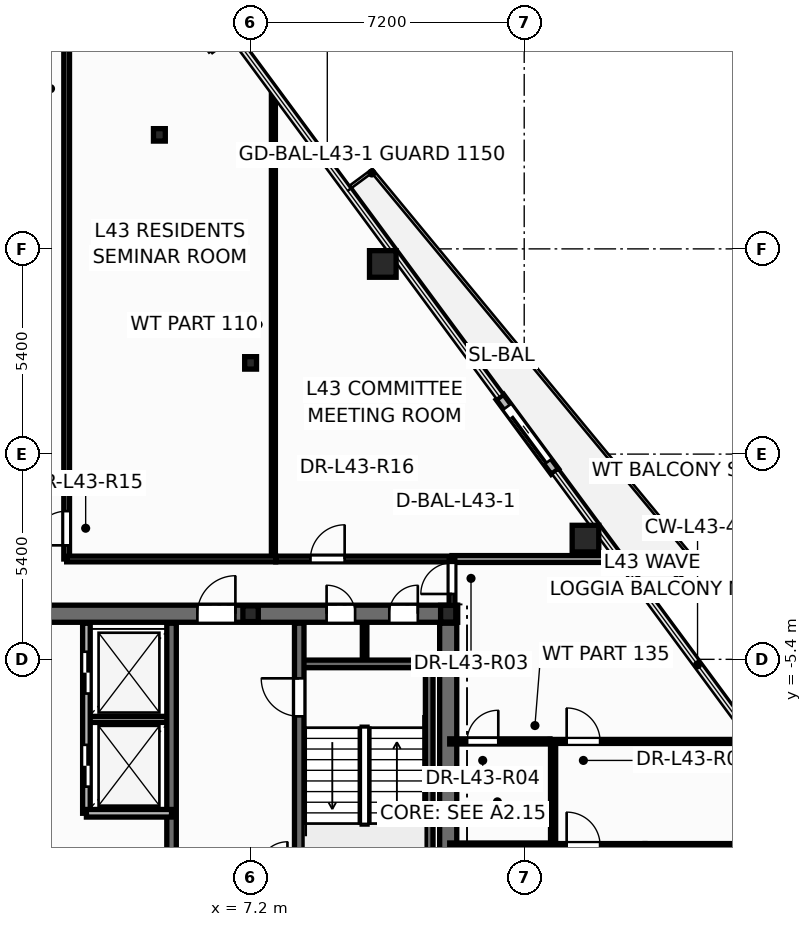
"""IFC4 building model, lengths in metres.
Left out: names, types, materials, properties, quantities, classifications, styles, units other than length and angle.
Written with IfcOpenShell. Run it as: python <this file> out.ifc"""

import sys

from ifc_helpers import new_model, si_unit, direction, frame, frame_2d, origin, origin_2d, place, context, subcontext, project, spatial, rectangle, hollow_circle, i_section, extrude, element, fill, save


model = new_model("IFC4")
c1 = context("Model", 3, precision=1e-05, world=origin(), true_north=direction((0.0, 1.0)))
c2 = subcontext(c1, "Body", "Model", "MODEL_VIEW")
j1 = project(units=[si_unit("LENGTHUNIT", "METRE"), si_unit("PLANEANGLEUNIT", "RADIAN")], contexts=[c1])
p1 = place(None, origin())
s1 = spatial("IfcSite", under=j1, at=p1, CompositionType="ELEMENT")
p2 = place(p1, origin())
s2 = spatial("IfcBuilding", under=s1, at=p2, CompositionType="ELEMENT")
p3 = place(p2, frame((0.0, 0.0, 165.3)))
s3 = spatial("IfcBuildingStorey", under=s2, at=p3, CompositionType="ELEMENT", Elevation=165.3)
for number, where, z_axis, x_axis in (
    (1, (16.012, -2.223, 0.0), (0.0, 0.0, 1.0), (1.0, 0.0, 0.0)),
    (2, (10.679, 5.003, 0.0), (0.0, 0.0, 1.0), (1.0, 0.0, 0.0)),
):
    element("IfcColumn", number, at=place(p3, frame(where, z_axis=z_axis, x_axis=x_axis)), inside=s3, PredefinedType="COLUMN", context=c2, shape_type="SweptSolid", body=[
        extrude(hollow_circle(Radius=0.35, WallThickness=0.03, at=origin_2d()), origin(), (0.0, 0.0, 1.0), 3.6),
    ])
p4 = place(p3, frame((12.4, -4.2, 0.0), z_axis=(0.0, 0.0, 1.0), x_axis=(1.0, 0.0, 0.0)))
e3 = element("IfcColumn", 3, at=p4, inside=s3, PredefinedType="COLUMN", context=c2, shape_type="SweptSolid", body=[
    extrude(i_section(OverallWidth=0.4, OverallDepth=0.44, WebThickness=0.028, FlangeThickness=0.04, at=origin_2d()), origin(), (0.0, 0.0, 1.0), 3.6),
])
p5 = place(p3, frame((7.2, -4.2, 0.0), z_axis=(0.0, 0.0, 1.0), x_axis=(1.0, 0.0, 0.0)))
e4 = element("IfcColumn", 4, at=p5, inside=s3, PredefinedType="PILASTER", context=c2, shape_type="SweptSolid", body=[
    extrude(i_section(OverallWidth=0.405, OverallDepth=0.414, WebThickness=0.022, FlangeThickness=0.032, at=origin_2d()), origin(), (0.0, 0.0, 1.0), 3.6),
])
for number, where, z_axis, x_axis in (
    (5, (7.2, 2.4, 0.0), (0.0, 0.0, 1.0), (1.0, 0.0, 0.0)),
    (6, (4.8, 8.4, 0.0), (0.0, 0.0, 1.0), (1.0, 0.0, 0.0)),
):
    element("IfcColumn", number, at=place(p3, frame(where, z_axis=z_axis, x_axis=x_axis)), inside=s3, PredefinedType="COLUMN", context=c2, shape_type="SweptSolid", body=[
        extrude(i_section(OverallWidth=0.311, OverallDepth=0.327, WebThickness=0.016, FlangeThickness=0.025, at=origin_2d()), origin(), (0.0, 0.0, 1.0), 3.6),
    ])
p6 = place(p3, frame((15.208, -0.461, -0.015), z_axis=(0.0, 0.0, 1.0), x_axis=(-0.593785976482, 0.804623026102, 0.0)))
e7 = element("IfcWall", 7, at=p6, inside=s3, PredefinedType="STANDARD", context=c2, shape_type="SweptSolid", body=[
    extrude(rectangle(XDim=2.44, YDim=0.24, at=frame_2d((1.22, 0.0))), origin(), (0.0, 0.0, 1.0), 2.737),
])
p7 = place(p6, frame((0.32, 0.0, 0.015)))
e8 = element("IfcOpeningElement", 8, at=p7, cuts=e7, PredefinedType="OPENING", context=c2, shape_type="SweptSolid", body=[
    extrude(rectangle(XDim=1.806, YDim=2.204, at=frame_2d((0.9, 1.102))), frame((0.0, 0.13, 0.0), z_axis=(0.0, -1.0, 0.0), x_axis=(1.0, 0.0, 0.0)), (0.0, 0.0, 1.0), 0.26),
])
p8 = place(p3, frame((2.88, -6.98, 0.0), z_axis=(0.0, 0.0, 1.0), x_axis=(1.0, 0.0, 0.0)))
e9 = element("IfcWall", 9, at=p8, inside=s3, PredefinedType="PARTITIONING", context=c2, shape_type="SweptSolid", body=[
    extrude(rectangle(XDim=2.24, YDim=0.16, at=frame_2d((1.12, 0.0))), origin(), (0.0, 0.0, 1.0), 3.28),
])
p9 = place(p3, frame((10.2, -5.52, 0.0), z_axis=(0.0, 0.0, 1.0), x_axis=(0.0, 1.0, 0.0)))
e10 = element("IfcWall", 10, at=p9, inside=s3, PredefinedType="PARTITIONING", context=c2, shape_type="SweptSolid", body=[
    extrude(rectangle(XDim=1.12, YDim=0.12, at=frame_2d((0.56, 0.0))), origin(), (0.0, 0.0, 1.0), 3.28),
])
p10 = place(p3, frame((-12.65, -4.2, 0.0), z_axis=(0.0, 0.0, 1.0), x_axis=(1.0, 0.0, 0.0)))
e11 = element("IfcWall", 11, at=p10, inside=s3, PredefinedType="SHEAR", context=c2, shape_type="SweptSolid", body=[
    extrude(rectangle(XDim=25.3, YDim=0.45, at=frame_2d((12.65, 0.0))), origin(), (0.0, 0.0, 1.0), 3.6),
])
p11 = place(p10, frame((1.85, 0.0, 0.0)))
e12 = element("IfcOpeningElement", 12, at=p11, cuts=e11, PredefinedType="OPENING", context=c2, shape_type="SweptSolid", body=[
    extrude(rectangle(XDim=0.756, YDim=2.054, at=frame_2d((0.375, 1.027))), frame((0.0, 0.235, 0.0), z_axis=(0.0, -1.0, 0.0), x_axis=(1.0, 0.0, 0.0)), (0.0, 0.0, 1.0), 0.47),
])
p12 = place(p10, frame((21.85, 0.0, 0.0)))
e13 = element("IfcOpeningElement", 13, at=p12, cuts=e11, PredefinedType="OPENING", context=c2, shape_type="SweptSolid", body=[
    extrude(rectangle(XDim=0.756, YDim=2.054, at=frame_2d((0.375, 1.027))), frame((0.0, 0.235, 0.0), z_axis=(0.0, -1.0, 0.0), x_axis=(1.0, 0.0, 0.0)), (0.0, 0.0, 1.0), 0.47),
])
p13 = place(p10, frame((23.5, 0.0, 0.0)))
e14 = element("IfcOpeningElement", 14, at=p13, cuts=e11, PredefinedType="OPENING", context=c2, shape_type="SweptSolid", body=[
    extrude(rectangle(XDim=0.756, YDim=2.054, at=frame_2d((0.375, 1.027))), frame((0.0, 0.235, 0.0), z_axis=(0.0, -1.0, 0.0), x_axis=(1.0, 0.0, 0.0)), (0.0, 0.0, 1.0), 0.47),
])
p14 = place(p10, frame((5.85, 0.0, 0.0)))
e15 = element("IfcOpeningElement", 15, at=p14, cuts=e11, PredefinedType="OPENING", context=c2, shape_type="SweptSolid", body=[
    extrude(rectangle(XDim=1.006, YDim=2.104, at=frame_2d((0.5, 1.052))), frame((0.0, 0.235, 0.0), z_axis=(0.0, -1.0, 0.0), x_axis=(1.0, 0.0, 0.0)), (0.0, 0.0, 1.0), 0.47),
])
p15 = place(p10, frame((10.35, 0.0, 0.0)))
e16 = element("IfcOpeningElement", 16, at=p15, cuts=e11, PredefinedType="OPENING", context=c2, shape_type="SweptSolid", body=[
    extrude(rectangle(XDim=1.406, YDim=2.154, at=frame_2d((0.7, 1.077))), frame((0.0, 0.235, 0.0), z_axis=(0.0, -1.0, 0.0), x_axis=(1.0, 0.0, 0.0)), (0.0, 0.0, 1.0), 0.47),
])
p16 = place(p10, frame((18.45, 0.0, 0.0)))
e17 = element("IfcOpeningElement", 17, at=p16, cuts=e11, PredefinedType="OPENING", context=c2, shape_type="SweptSolid", body=[
    extrude(rectangle(XDim=1.006, YDim=2.104, at=frame_2d((0.5, 1.052))), frame((0.0, 0.235, 0.0), z_axis=(0.0, -1.0, 0.0), x_axis=(1.0, 0.0, 0.0)), (0.0, 0.0, 1.0), 0.47),
])
p17 = place(p3, frame((8.48, -5.52, 0.0), z_axis=(0.0, 0.0, 1.0), x_axis=(1.0, 0.0, 0.0)))
e18 = element("IfcWall", 18, at=p17, inside=s3, PredefinedType="SOLIDWALL", context=c2, shape_type="SweptSolid", body=[
    extrude(rectangle(XDim=3.87, YDim=0.2, at=frame_2d((1.935, 0.0))), origin(), (0.0, 0.0, 1.0), 3.6),
])
p18 = place(p3, frame((11.9, -13.1, 0.0), z_axis=(0.0, 0.0, 1.0), x_axis=(0.0, 1.0, 0.0)))
e19 = element("IfcWall", 19, at=p18, inside=s3, PredefinedType="SOLIDWALL", context=c2, shape_type="SweptSolid", body=[
    extrude(rectangle(XDim=7.58, YDim=0.2, at=frame_2d((3.79, 0.0))), origin(), (0.0, 0.0, 1.0), 3.6),
])
p19 = place(p3, frame((8.48, -13.85, 0.0), z_axis=(0.0, 0.0, 1.0), x_axis=(0.0, 1.0, 0.0)))
e20 = element("IfcWall", 20, at=p19, inside=s3, PredefinedType="SHEAR", context=c2, shape_type="SweptSolid", body=[
    extrude(rectangle(XDim=9.4, YDim=0.25, at=frame_2d((4.7, 0.0))), origin(), (0.0, 0.0, 1.0), 3.6),
])
p20 = place(p19, frame((6.95, 0.0, 0.0)))
e21 = element("IfcOpeningElement", 21, at=p20, cuts=e20, PredefinedType="OPENING", context=c2, shape_type="SweptSolid", body=[
    extrude(rectangle(XDim=1.006, YDim=2.104, at=frame_2d((0.5, 1.052))), frame((0.0, 0.135, 0.0), z_axis=(0.0, -1.0, 0.0), x_axis=(1.0, 0.0, 0.0)), (0.0, 0.0, 1.0), 0.27),
])
p21 = place(p3, frame((5.12, -13.85, 0.0), z_axis=(0.0, 0.0, 1.0), x_axis=(0.0, 1.0, 0.0)))
e22 = element("IfcWall", 22, at=p21, inside=s3, PredefinedType="SHEAR", context=c2, shape_type="SweptSolid", body=[
    extrude(rectangle(XDim=9.4, YDim=0.25, at=frame_2d((4.7, 0.0))), origin(), (0.0, 0.0, 1.0), 3.6),
])
p22 = place(p3, frame((12.4, -13.85, 0.0), z_axis=(0.0, 0.0, 1.0), x_axis=(0.0, 1.0, 0.0)))
e23 = element("IfcWall", 23, at=p22, inside=s3, PredefinedType="SHEAR", context=c2, shape_type="SweptSolid", body=[
    extrude(rectangle(XDim=9.4, YDim=0.45, at=frame_2d((4.7, 0.0))), origin(), (0.0, 0.0, 1.0), 3.6),
])
p23 = place(p3, frame((2.88, -9.45, 0.0), z_axis=(0.0, 0.0, 1.0), x_axis=(0.0, 1.0, 0.0)))
e24 = element("IfcWall", 24, at=p23, inside=s3, PredefinedType="SOLIDWALL", context=c2, shape_type="SweptSolid", body=[
    extrude(rectangle(XDim=5.0, YDim=0.2, at=frame_2d((2.5, 0.0))), origin(), (0.0, 0.0, 1.0), 3.28),
])
p24 = place(p23, frame((0.7, 0.0, 0.0)))
e25 = element("IfcOpeningElement", 25, at=p24, cuts=e24, PredefinedType="OPENING", context=c2, shape_type="SweptSolid", body=[
    extrude(rectangle(XDim=1.106, YDim=2.104, at=frame_2d((0.55, 1.052))), frame((0.0, 0.11, 0.0), z_axis=(0.0, -1.0, 0.0), x_axis=(1.0, 0.0, 0.0)), (0.0, 0.0, 1.0), 0.22),
])
p25 = place(p23, frame((3.15, 0.0, 0.0)))
e26 = element("IfcOpeningElement", 26, at=p25, cuts=e24, PredefinedType="OPENING", context=c2, shape_type="SweptSolid", body=[
    extrude(rectangle(XDim=1.106, YDim=2.104, at=frame_2d((0.55, 1.052))), frame((0.0, 0.11, 0.0), z_axis=(0.0, -1.0, 0.0), x_axis=(1.0, 0.0, 0.0)), (0.0, 0.0, 1.0), 0.22),
])
p26 = place(p3, frame((2.88, -9.45, 0.0), z_axis=(0.0, 0.0, 1.0), x_axis=(1.0, 0.0, 0.0)))
e27 = element("IfcWall", 27, at=p26, inside=s3, PredefinedType="SOLIDWALL", context=c2, shape_type="SweptSolid", body=[
    extrude(rectangle(XDim=2.24, YDim=0.2, at=frame_2d((1.12, 0.0))), origin(), (0.0, 0.0, 1.0), 3.28),
])
p27 = place(p3, frame((2.36, -2.76, 0.0), z_axis=(0.0, 0.0, 1.0), x_axis=(0.0, 1.0, 0.0)))
e28 = element("IfcWall", 28, at=p27, inside=s3, PredefinedType="PARTITIONING", context=c2, shape_type="SweptSolid", body=[
    extrude(rectangle(XDim=14.56, YDim=0.15, at=frame_2d((7.28, 0.0))), origin(), (0.0, 0.0, 1.0), 2.255),
])
p28 = place(p27, frame((0.36, 0.0, 0.0)))
e29 = element("IfcOpeningElement", 29, at=p28, cuts=e28, PredefinedType="OPENING", context=c2, shape_type="SweptSolid", body=[
    extrude(rectangle(XDim=0.906, YDim=2.104, at=frame_2d((0.45, 1.052))), frame((0.0, 0.085, 0.0), z_axis=(0.0, -1.0, 0.0), x_axis=(1.0, 0.0, 0.0)), (0.0, 0.0, 1.0), 0.17),
])
p29 = place(p3, frame((7.8, -2.76, 0.0), z_axis=(0.0, 0.0, 1.0), x_axis=(0.0, 1.0, 0.0)))
e30 = element("IfcWall", 30, at=p29, inside=s3, PredefinedType="PARTITIONING", context=c2, shape_type="SweptSolid", body=[
    extrude(rectangle(XDim=12.338, YDim=0.105, at=frame_2d((6.169, 0.0))), origin(), (0.0, 0.0, 1.0), 2.547),
])
p30 = place(p3, frame((15.08, -7.56, 0.0), z_axis=(0.0, 0.0, 1.0), x_axis=(1.0, 0.0, 0.0)))
e31 = element("IfcWall", 31, at=p30, inside=s3, PredefinedType="PARTITIONING", context=c2, shape_type="SweptSolid", body=[
    extrude(rectangle(XDim=5.62, YDim=0.105, at=frame_2d((2.81, 0.0))), origin(), (0.0, 0.0, 1.0), 2.255),
])
p31 = place(p30, frame((0.437, 0.0, 0.0)))
e32 = element("IfcOpeningElement", 32, at=p31, cuts=e31, PredefinedType="OPENING", context=c2, shape_type="SweptSolid", body=[
    extrude(rectangle(XDim=0.886, YDim=2.104, at=frame_2d((0.44, 1.052))), frame((0.0, 0.062, 0.0), z_axis=(0.0, -1.0, 0.0), x_axis=(1.0, 0.0, 0.0)), (0.0, 0.0, 1.0), 0.125),
])
p32 = place(p3, frame((2.36, -2.76, 0.0), z_axis=(0.0, 0.0, 1.0), x_axis=(1.0, 0.0, 0.0)))
e33 = element("IfcWall", 33, at=p32, inside=s3, PredefinedType="PARTITIONING", context=c2, shape_type="SweptSolid", body=[
    extrude(rectangle(XDim=5.5, YDim=0.15, at=frame_2d((2.75, 0.0))), origin(), (0.0, 0.0, 1.0), 2.255),
])
p33 = place(p3, frame((7.862, -2.76, 0.0), z_axis=(0.0, 0.0, 1.0), x_axis=(1.0, 0.0, 0.0)))
e34 = element("IfcWall", 34, at=p33, inside=s3, PredefinedType="PARTITIONING", context=c2, shape_type="SweptSolid", body=[
    extrude(rectangle(XDim=4.638, YDim=0.15, at=frame_2d((2.319, 0.0))), origin(), (0.0, 0.0, 1.0), 3.28),
])
p34 = place(p33, frame((0.913, 0.0, 0.0)))
e35 = element("IfcOpeningElement", 35, at=p34, cuts=e34, PredefinedType="OPENING", context=c2, shape_type="SweptSolid", body=[
    extrude(rectangle(XDim=0.906, YDim=2.104, at=frame_2d((0.45, 1.052))), frame((0.0, 0.085, 0.0), z_axis=(0.0, -1.0, 0.0), x_axis=(1.0, 0.0, 0.0)), (0.0, 0.0, 1.0), 0.17),
])
p35 = place(p3, frame((17.58, -10.3, 0.0), z_axis=(0.0, 0.0, 1.0), x_axis=(1.0, 0.0, 0.0)))
e36 = element("IfcWall", 36, at=p35, inside=s3, PredefinedType="PARTITIONING", context=c2, shape_type="SweptSolid", body=[
    extrude(rectangle(XDim=4.64, YDim=0.105, at=frame_2d((2.32, 0.0))), origin(), (0.0, 0.0, 1.0), 2.255),
])
p36 = place(p3, frame((12.5, -2.76, 0.0), z_axis=(0.0, 0.0, 1.0), x_axis=(1.0, 0.0, 0.0)))
e37 = element("IfcWall", 37, at=p36, inside=s3, PredefinedType="PARTITIONING", context=c2, shape_type="SweptSolid", body=[
    extrude(rectangle(XDim=4.405, YDim=0.18, at=frame_2d((2.203, 0.0))), origin(), (0.0, 0.0, 1.0), 2.722),
])
p37 = place(p3, frame((17.64, -13.9, 0.0), z_axis=(0.0, 0.0, 1.0), x_axis=(0.0, 1.0, 0.0)))
e38 = element("IfcWall", 38, at=p37, inside=s3, PredefinedType="PARTITIONING", context=c2, shape_type="SweptSolid", body=[
    extrude(rectangle(XDim=3.6, YDim=0.105, at=frame_2d((1.8, 0.0))), origin(), (0.0, 0.0, 1.0), 3.28),
])
p38 = place(p3, frame((12.44, -7.56, 0.0), z_axis=(0.0, 0.0, 1.0), x_axis=(1.0, 0.0, 0.0)))
e39 = element("IfcWall", 39, at=p38, inside=s3, PredefinedType="PARTITIONING", context=c2, shape_type="SweptSolid", body=[
    extrude(rectangle(XDim=2.638, YDim=0.135, at=frame_2d((1.319, 0.0))), origin(), (0.0, 0.0, 1.0), 2.722),
])
p39 = place(p38, frame((0.458, 0.0, 0.0)))
e40 = element("IfcOpeningElement", 40, at=p39, cuts=e39, PredefinedType="OPENING", context=c2, shape_type="SweptSolid", body=[
    extrude(rectangle(XDim=0.826, YDim=2.104, at=frame_2d((0.41, 1.052))), frame((0.0, 0.078, 0.0), z_axis=(0.0, -1.0, 0.0), x_axis=(1.0, 0.0, 0.0)), (0.0, 0.0, 1.0), 0.155),
])
p40 = place(p3, frame((15.16, -10.3, 0.0), z_axis=(0.0, 0.0, 1.0), x_axis=(0.0, 1.0, 0.0)))
e41 = element("IfcWall", 41, at=p40, inside=s3, PredefinedType="PARTITIONING", context=c2, shape_type="SweptSolid", body=[
    extrude(rectangle(XDim=2.74, YDim=0.135, at=frame_2d((1.37, 0.0))), origin(), (0.0, 0.0, 1.0), 3.28),
])
p41 = place(p3, frame((12.44, -10.3, 0.0), z_axis=(0.0, 0.0, 1.0), x_axis=(1.0, 0.0, 0.0)))
e42 = element("IfcWall", 42, at=p41, inside=s3, PredefinedType="PARTITIONING", context=c2, shape_type="SweptSolid", body=[
    extrude(rectangle(XDim=2.72, YDim=0.135, at=frame_2d((1.36, 0.0))), origin(), (0.0, 0.0, 1.0), 2.722),
])
p42 = place(p3, frame((15.16, -10.3, 0.0), z_axis=(0.0, 0.0, 1.0), x_axis=(1.0, 0.0, 0.0)))
e43 = element("IfcWall", 43, at=p42, inside=s3, PredefinedType="PARTITIONING", context=c2, shape_type="SweptSolid", body=[
    extrude(rectangle(XDim=2.418, YDim=0.105, at=frame_2d((1.209, 0.0))), origin(), (0.0, 0.0, 1.0), 3.28),
])
p43 = place(p42, frame((0.357, 0.0, 0.0)))
e44 = element("IfcOpeningElement", 44, at=p43, cuts=e43, PredefinedType="OPENING", context=c2, shape_type="SweptSolid", body=[
    extrude(rectangle(XDim=0.886, YDim=2.104, at=frame_2d((0.44, 1.052))), frame((0.0, 0.062, 0.0), z_axis=(0.0, -1.0, 0.0), x_axis=(1.0, 0.0, 0.0)), (0.0, 0.0, 1.0), 0.125),
])
p44 = place(p3, frame((12.5, -4.24, 0.0), z_axis=(0.0, 0.0, 1.0), x_axis=(0.0, 1.0, 0.0)))
e45 = element("IfcWall", 45, at=p44, inside=s3, PredefinedType="PARTITIONING", context=c2, shape_type="SweptSolid", body=[
    extrude(rectangle(XDim=1.48, YDim=0.15, at=frame_2d((0.74, 0.0))), origin(), (0.0, 0.0, 1.0), 2.255),
])
p45 = place(p44, frame((0.56, 0.0, 0.0)))
e46 = element("IfcOpeningElement", 46, at=p45, cuts=e45, PredefinedType="OPENING", context=c2, shape_type="SweptSolid", body=[
    extrude(rectangle(XDim=0.826, YDim=2.104, at=frame_2d((0.41, 1.052))), frame((0.0, 0.085, 0.0), z_axis=(0.0, -1.0, 0.0), x_axis=(1.0, 0.0, 0.0)), (0.0, 0.0, 1.0), 0.17),
])
p46 = place(p7, origin())
e47 = element("IfcDoor", 47, at=p46, inside=s3, OperationType="SLIDING_TO_LEFT", PredefinedType="DOOR", context=c2, shape_type="SweptSolid", body=[
    extrude(rectangle(XDim=1.8, YDim=2.2, at=frame_2d((0.9, 1.1))), frame((0.0, 0.025, 0.0), z_axis=(0.0, -1.0, 0.0), x_axis=(1.0, 0.0, 0.0)), (0.0, 0.0, 1.0), 0.05),
])
fill(e8, e47)
p47 = place(p24, origin())
e48 = element("IfcDoor", 48, at=p47, inside=s3, OperationType="DOUBLE_DOOR_SLIDING", PredefinedType="DOOR", context=c2, shape_type="SweptSolid", body=[
    extrude(rectangle(XDim=1.1, YDim=2.1, at=frame_2d((0.55, 1.05))), frame((0.0, 0.025, 0.0), z_axis=(0.0, -1.0, 0.0), x_axis=(1.0, 0.0, 0.0)), (0.0, 0.0, 1.0), 0.05),
])
fill(e25, e48)
p48 = place(p25, origin())
e49 = element("IfcDoor", 49, at=p48, inside=s3, OperationType="DOUBLE_DOOR_SLIDING", PredefinedType="DOOR", context=c2, shape_type="SweptSolid", body=[
    extrude(rectangle(XDim=1.1, YDim=2.1, at=frame_2d((0.55, 1.05))), frame((0.0, 0.025, 0.0), z_axis=(0.0, -1.0, 0.0), x_axis=(1.0, 0.0, 0.0)), (0.0, 0.0, 1.0), 0.05),
])
fill(e26, e49)
p49 = place(p20, origin())
e50 = element("IfcDoor", 50, at=p49, inside=s3, OperationType="SINGLE_SWING_RIGHT", PredefinedType="DOOR", context=c2, shape_type="SweptSolid", body=[
    extrude(rectangle(XDim=1.0, YDim=2.1, at=frame_2d((0.5, 1.05))), frame((0.0, 0.025, 0.0), z_axis=(0.0, -1.0, 0.0), x_axis=(1.0, 0.0, 0.0)), (0.0, 0.0, 1.0), 0.05),
])
fill(e21, e50)
p50 = place(p12, origin())
e51 = element("IfcDoor", 51, at=p50, inside=s3, OperationType="SINGLE_SWING_LEFT", PredefinedType="DOOR", context=c2, shape_type="SweptSolid", body=[
    extrude(rectangle(XDim=0.75, YDim=2.05, at=frame_2d((0.375, 1.025))), frame((0.0, 0.025, 0.0), z_axis=(0.0, -1.0, 0.0), x_axis=(1.0, 0.0, 0.0)), (0.0, 0.0, 1.0), 0.05),
])
fill(e13, e51)
p51 = place(p13, origin())
e52 = element("IfcDoor", 52, at=p51, inside=s3, OperationType="SINGLE_SWING_RIGHT", PredefinedType="DOOR", context=c2, shape_type="SweptSolid", body=[
    extrude(rectangle(XDim=0.75, YDim=2.05, at=frame_2d((0.375, 1.025))), frame((0.0, 0.025, 0.0), z_axis=(0.0, -1.0, 0.0), x_axis=(1.0, 0.0, 0.0)), (0.0, 0.0, 1.0), 0.05),
])
fill(e14, e52)
p52 = place(p16, origin())
e53 = element("IfcDoor", 53, at=p52, inside=s3, OperationType="SINGLE_SWING_RIGHT", PredefinedType="DOOR", context=c2, shape_type="SweptSolid", body=[
    extrude(rectangle(XDim=1.0, YDim=2.1, at=frame_2d((0.5, 1.05))), frame((0.0, 0.025, 0.0), z_axis=(0.0, -1.0, 0.0), x_axis=(1.0, 0.0, 0.0)), (0.0, 0.0, 1.0), 0.05),
])
fill(e17, e53)
p53 = place(p45, origin())
e54 = element("IfcDoor", 54, at=p53, inside=s3, OperationType="SINGLE_SWING_LEFT", PredefinedType="DOOR", context=c2, shape_type="SweptSolid", body=[
    extrude(rectangle(XDim=0.82, YDim=2.1, at=frame_2d((0.41, 1.05))), frame((0.0, 0.025, 0.0), z_axis=(0.0, -1.0, 0.0), x_axis=(1.0, 0.0, 0.0)), (0.0, 0.0, 1.0), 0.05),
])
fill(e46, e54)
p54 = place(p39, origin())
e55 = element("IfcDoor", 55, at=p54, inside=s3, OperationType="SINGLE_SWING_RIGHT", PredefinedType="DOOR", context=c2, shape_type="SweptSolid", body=[
    extrude(rectangle(XDim=0.82, YDim=2.1, at=frame_2d((0.41, 1.05))), frame((0.0, 0.025, 0.0), z_axis=(0.0, -1.0, 0.0), x_axis=(1.0, 0.0, 0.0)), (0.0, 0.0, 1.0), 0.05),
])
fill(e40, e55)
p55 = place(p31, origin())
e56 = element("IfcDoor", 56, at=p55, inside=s3, OperationType="SINGLE_SWING_LEFT", PredefinedType="DOOR", context=c2, shape_type="SweptSolid", body=[
    extrude(rectangle(XDim=0.88, YDim=2.1, at=frame_2d((0.44, 1.05))), frame((0.0, 0.025, 0.0), z_axis=(0.0, -1.0, 0.0), x_axis=(1.0, 0.0, 0.0)), (0.0, 0.0, 1.0), 0.05),
])
fill(e32, e56)
p56 = place(p28, origin())
e57 = element("IfcDoor", 57, at=p56, inside=s3, OperationType="SINGLE_SWING_LEFT", PredefinedType="DOOR", context=c2, shape_type="SweptSolid", body=[
    extrude(rectangle(XDim=0.9, YDim=2.1, at=frame_2d((0.45, 1.05))), frame((0.0, 0.025, 0.0), z_axis=(0.0, -1.0, 0.0), x_axis=(1.0, 0.0, 0.0)), (0.0, 0.0, 1.0), 0.05),
])
fill(e29, e57)
p57 = place(p34, origin())
e58 = element("IfcDoor", 58, at=p57, inside=s3, OperationType="SINGLE_SWING_RIGHT", PredefinedType="DOOR", context=c2, shape_type="SweptSolid", body=[
    extrude(rectangle(XDim=0.9, YDim=2.1, at=frame_2d((0.45, 1.05))), frame((0.0, 0.025, 0.0), z_axis=(0.0, -1.0, 0.0), x_axis=(1.0, 0.0, 0.0)), (0.0, 0.0, 1.0), 0.05),
])
fill(e35, e58)
p58 = place(p43, origin())
e59 = element("IfcDoor", 59, at=p58, inside=s3, OperationType="SINGLE_SWING_LEFT", PredefinedType="DOOR", context=c2, shape_type="SweptSolid", body=[
    extrude(rectangle(XDim=0.88, YDim=2.1, at=frame_2d((0.44, 1.05))), frame((0.0, 0.025, 0.0), z_axis=(0.0, -1.0, 0.0), x_axis=(1.0, 0.0, 0.0)), (0.0, 0.0, 1.0), 0.05),
])
fill(e44, e59)
save(model, sys.argv[1])
